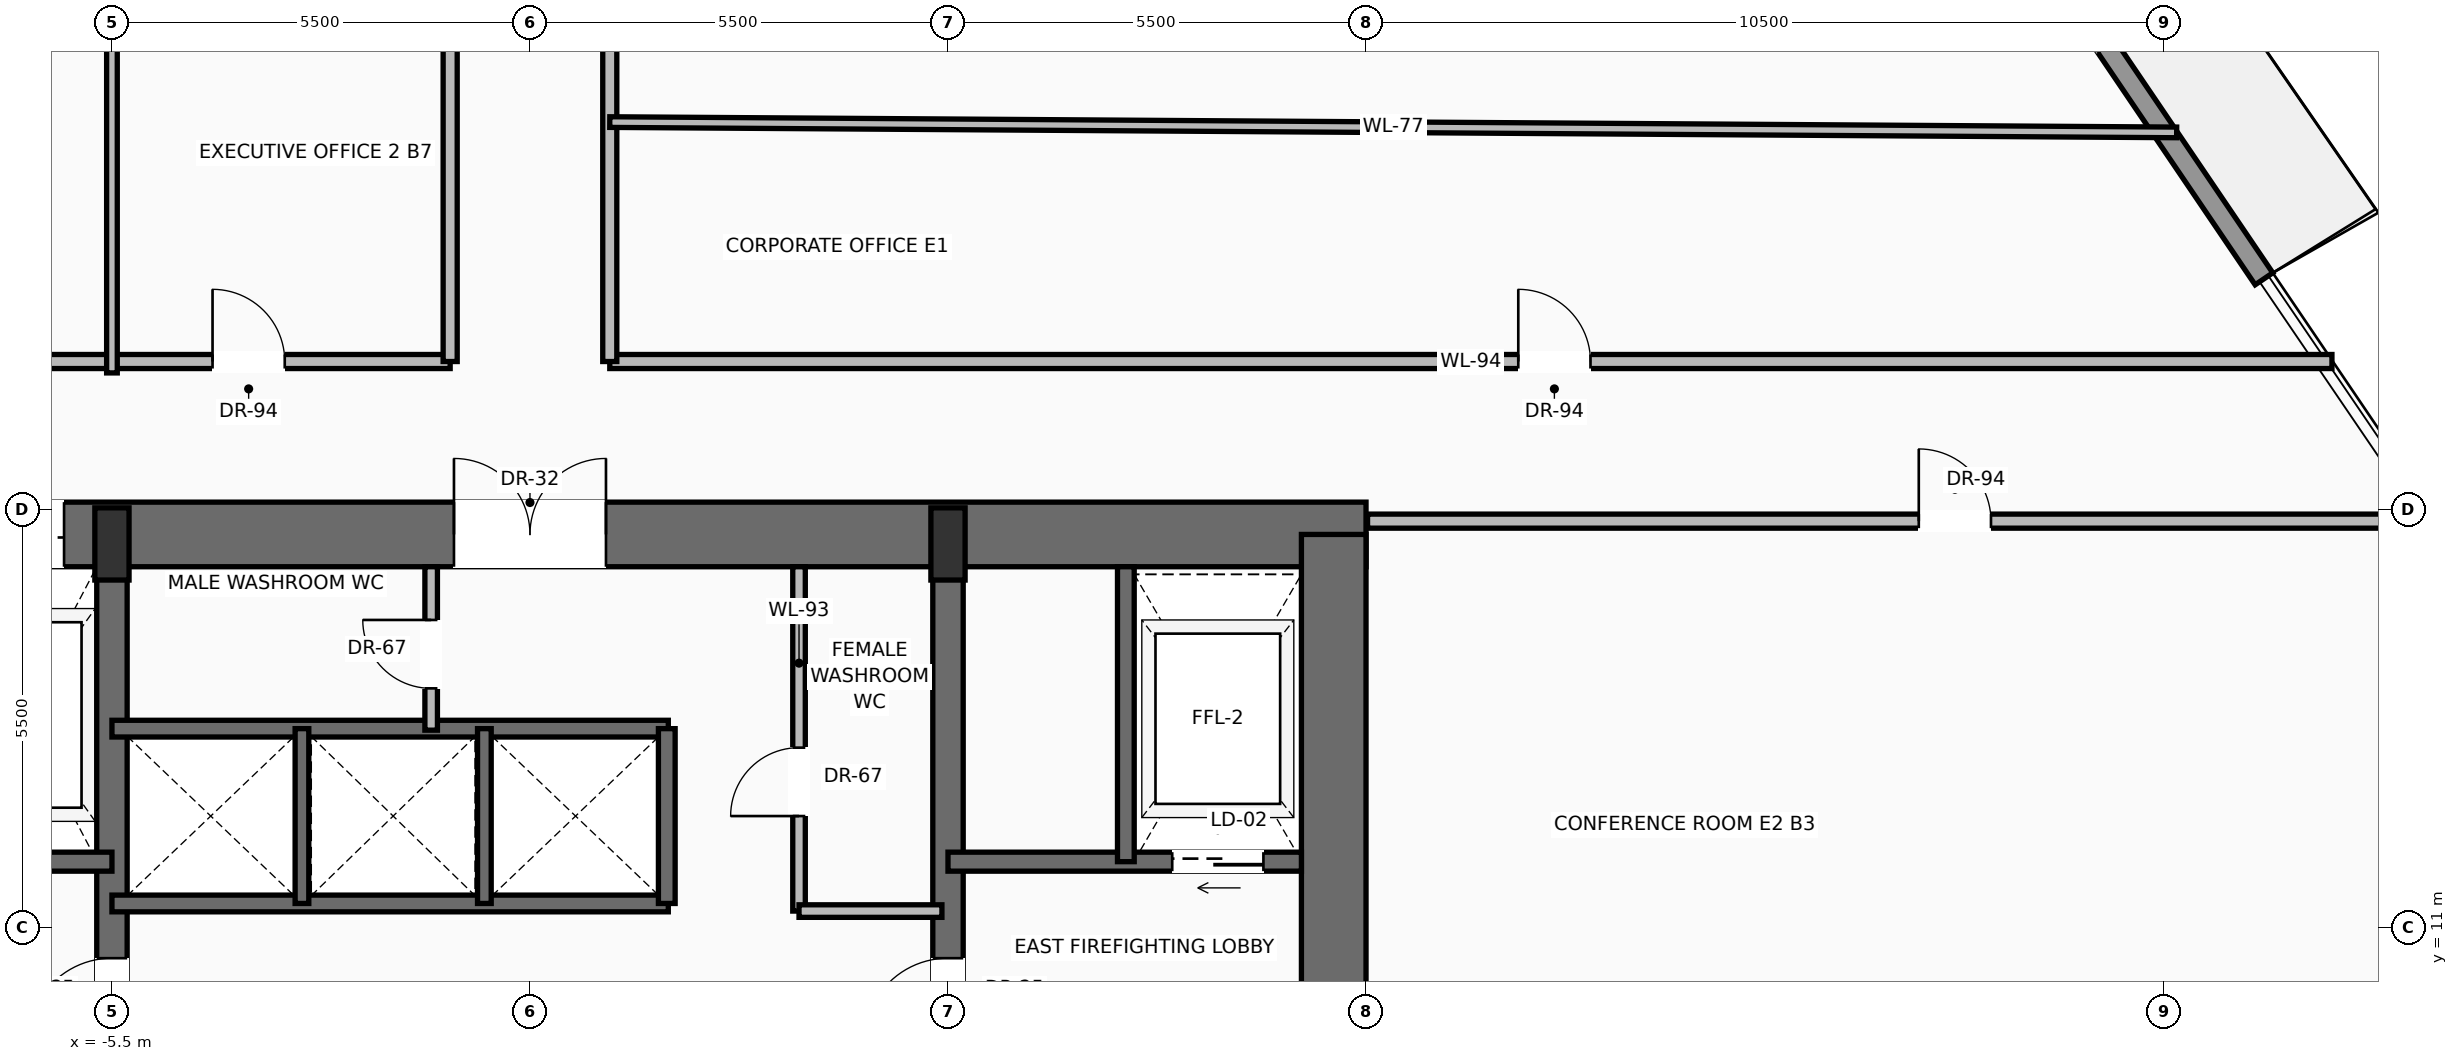
"""IFC4 building model, lengths in metres.
Left out: names, types, materials, properties, quantities, classifications, styles, units other than length and angle.
Written with IfcOpenShell. Run it as: python <this file> out.ifc"""

import sys

from ifc_helpers import new_model, si_unit, direction, frame, frame_2d, origin, origin_2d, place, context, subcontext, project, spatial, rectangle, extrude, source, transform, mapped, element, fill, save


model = new_model("IFC4")
c1 = context("Model", 3, precision=1e-05, world=origin(), true_north=direction((0.0, 1.0)))
c2 = subcontext(c1, "Body", "Model", "MODEL_VIEW")
j1 = project(units=[si_unit("LENGTHUNIT", "METRE"), si_unit("PLANEANGLEUNIT", "RADIAN")], contexts=[c1])
p1 = place(None, origin())
s1 = spatial("IfcSite", under=j1, at=p1, CompositionType="ELEMENT")
p2 = place(p1, origin())
s2 = spatial("IfcBuilding", under=s1, at=p2, CompositionType="ELEMENT")
p3 = place(p2, frame((0.0, 0.0, 34.9)))
s3 = spatial("IfcBuildingStorey", under=s2, at=p3, CompositionType="ELEMENT", Elevation=34.9)
p4 = place(p3, frame((-11.0, 16.175, 0.0), z_axis=(0.0, 0.0, 1.0), x_axis=(1.0, 0.0, 0.0)))
e1 = element("IfcWall", 1, at=p4, inside=s3, PredefinedType="SHEAR", context=c2, shape_type="SweptSolid", body=[
    extrude(rectangle(XDim=22.0, YDim=0.85, at=frame_2d((11.0, 0.0))), origin(), (0.0, 0.0, 1.0), 3.45),
])
p5 = place(p4, frame((3.57, 0.0, 0.0)))
e2 = element("IfcOpeningElement", 2, at=p5, cuts=e1, PredefinedType="OPENING", context=c2, shape_type="SweptSolid", body=[
    extrude(rectangle(XDim=1.3, YDim=2.3, at=frame_2d((0.65, 1.15))), frame((0.0, 0.435, 0.0), z_axis=(0.0, -1.0, 0.0), x_axis=(1.0, 0.0, 0.0)), (0.0, 0.0, 1.0), 0.87),
])
p6 = place(p4, frame((10.0, 0.0, 0.0)))
e3 = element("IfcOpeningElement", 3, at=p6, cuts=e1, PredefinedType="OPENING", context=c2, shape_type="SweptSolid", body=[
    extrude(rectangle(XDim=2.0, YDim=2.4, at=frame_2d((1.0, 1.2))), frame((0.0, 0.435, 0.0), z_axis=(0.0, -1.0, 0.0), x_axis=(1.0, 0.0, 0.0)), (0.0, 0.0, 1.0), 0.87),
])
p7 = place(p3, frame((10.575, 0.425, 0.0), z_axis=(0.0, 0.0, 1.0), x_axis=(0.0, 1.0, 0.0)))
e4 = element("IfcWall", 4, at=p7, inside=s3, PredefinedType="SHEAR", context=c2, shape_type="SweptSolid", body=[
    extrude(rectangle(XDim=15.75, YDim=0.85, at=frame_2d((7.875, 0.0))), origin(), (0.0, 0.0, 1.0), 3.45),
])
p8 = place(p3, frame((-5.5, 0.425, 0.0), z_axis=(0.0, 0.0, 1.0), x_axis=(0.0, 1.0, 0.0)))
e5 = element("IfcWall", 5, at=p8, inside=s3, PredefinedType="SHEAR", context=c2, shape_type="SweptSolid", body=[
    extrude(rectangle(XDim=15.75, YDim=0.4, at=frame_2d((7.875, 0.0))), origin(), (0.0, 0.0, 1.0), 3.45),
])
p9 = place(p8, frame((9.075, 0.0, 0.0)))
e6 = element("IfcOpeningElement", 6, at=p9, cuts=e5, PredefinedType="OPENING", context=c2, shape_type="SweptSolid", body=[
    extrude(rectangle(XDim=1.1, YDim=2.2, at=frame_2d((0.55, 1.1))), frame((0.0, 0.21, 0.0), z_axis=(0.0, -1.0, 0.0), x_axis=(1.0, 0.0, 0.0)), (0.0, 0.0, 1.0), 0.42),
])
p10 = place(p3, frame((5.5, 0.425, 0.0), z_axis=(0.0, 0.0, 1.0), x_axis=(0.0, 1.0, 0.0)))
e7 = element("IfcWall", 7, at=p10, inside=s3, PredefinedType="SHEAR", context=c2, shape_type="SweptSolid", body=[
    extrude(rectangle(XDim=15.75, YDim=0.4, at=frame_2d((7.875, 0.0))), origin(), (0.0, 0.0, 1.0), 3.45),
])
p11 = place(p10, frame((9.075, 0.0, 0.0)))
e8 = element("IfcOpeningElement", 8, at=p11, cuts=e7, PredefinedType="OPENING", context=c2, shape_type="SweptSolid", body=[
    extrude(rectangle(XDim=1.1, YDim=2.2, at=frame_2d((0.55, 1.1))), frame((0.0, 0.21, 0.0), z_axis=(0.0, -1.0, 0.0), x_axis=(1.0, 0.0, 0.0)), (0.0, 0.0, 1.0), 0.42),
])
m1 = source(origin(), c2, "Body", "SweptSolid", [
    extrude(rectangle(XDim=0.45, YDim=0.95, at=origin_2d()), origin(), (0.0, 0.0, 1.0), 3.7),
])
for number, where, z_axis, x_axis in (
    (9, (-5.5, 16.05, 0.0), (0.0, 0.0, 1.0), (1.0, 0.0, 0.0)),
    (10, (5.5, 16.05, 0.0), (0.0, 0.0, 1.0), (1.0, 0.0, 0.0)),
):
    element("IfcColumn", number, at=place(p3, frame(where, z_axis=z_axis, x_axis=x_axis)), inside=s3, PredefinedType="PILASTER", context=c2, shape_type="MappedRepresentation", body=[
        mapped(m1, transform((0.0, 0.0, 0.0), scale=1.0)),
    ])
p12 = place(p3, frame((13.629, 33.09, 0.0), z_axis=(0.0, 0.0, 1.0), x_axis=(0.56106773426, -0.827769894096, 0.0)))
e11 = element("IfcWall", 11, at=p12, inside=s3, PredefinedType="SOLIDWALL", context=c2, shape_type="SweptSolid", body=[
    extrude(rectangle(XDim=16.371, YDim=0.28, at=frame_2d((8.186, 0.0))), origin(), (0.0, 0.0, 1.0), 3.03),
])
p13 = place(p12, frame((3.929, 0.0, 0.0)))
e12 = element("IfcOpeningElement", 12, at=p13, cuts=e11, PredefinedType="OPENING", context=c2, shape_type="SweptSolid", body=[
    extrude(rectangle(XDim=1.6, YDim=2.35, at=frame_2d((0.8, 1.175))), frame((0.0, 0.15, 0.0), z_axis=(0.0, -1.0, 0.0), x_axis=(1.0, 0.0, 0.0)), (0.0, 0.0, 1.0), 0.3),
])
p14 = place(p12, frame((11.132, 0.0, 0.9)))
e13 = element("IfcOpeningElement", 13, at=p14, cuts=e11, PredefinedType="OPENING", context=c2, shape_type="SweptSolid", body=[
    extrude(rectangle(XDim=1.55, YDim=1.85, at=frame_2d((0.775, 0.925))), frame((0.0, 0.15, 0.0), z_axis=(0.0, -1.0, 0.0), x_axis=(1.0, 0.0, 0.0)), (0.0, 0.0, 1.0), 0.3),
])
p15 = place(p3, frame((-5.5, 11.87, 0.0), z_axis=(0.0, 0.0, 1.0), x_axis=(-1.0, 0.0, 0.0)))
e14 = element("IfcWall", 14, at=p15, inside=s3, PredefinedType="SOLIDWALL", context=c2, shape_type="SweptSolid", body=[
    extrude(rectangle(XDim=4.65, YDim=0.25, at=frame_2d((2.325, 0.0))), origin(), (0.0, 0.0, 1.0), 3.45),
])
p16 = place(p15, frame((2.95, 0.0, 0.0)))
e15 = element("IfcOpeningElement", 15, at=p16, cuts=e14, PredefinedType="OPENING", context=c2, shape_type="SweptSolid", body=[
    extrude(rectangle(XDim=1.2, YDim=2.25, at=frame_2d((0.6, 1.125))), frame((0.0, 0.135, 0.0), z_axis=(0.0, -1.0, 0.0), x_axis=(1.0, 0.0, 0.0)), (0.0, 0.0, 1.0), 0.27),
])
p17 = place(p3, frame((10.15, 11.87, 0.0), z_axis=(0.0, 0.0, 1.0), x_axis=(-1.0, 0.0, 0.0)))
e16 = element("IfcWall", 16, at=p17, inside=s3, PredefinedType="SOLIDWALL", context=c2, shape_type="SweptSolid", body=[
    extrude(rectangle(XDim=4.65, YDim=0.25, at=frame_2d((2.325, 0.0))), origin(), (0.0, 0.0, 1.0), 3.45),
])
p18 = place(p17, frame((0.5, 0.0, 0.0)))
e17 = element("IfcOpeningElement", 17, at=p18, cuts=e16, PredefinedType="OPENING", context=c2, shape_type="SweptSolid", body=[
    extrude(rectangle(XDim=1.2, YDim=2.25, at=frame_2d((0.6, 1.125))), frame((0.0, 0.135, 0.0), z_axis=(0.0, -1.0, 0.0), x_axis=(1.0, 0.0, 0.0)), (0.0, 0.0, 1.0), 0.27),
])
p19 = place(p3, frame((7.84, 11.87, 0.0), z_axis=(0.0, 0.0, 1.0), x_axis=(0.0, 1.0, 0.0)))
e18 = element("IfcWall", 18, at=p19, inside=s3, PredefinedType="SOLIDWALL", context=c2, shape_type="SweptSolid", body=[
    extrude(rectangle(XDim=3.88, YDim=0.22, at=frame_2d((1.94, 0.0))), origin(), (0.0, 0.0, 1.0), 3.45),
])
for number, where, z_axis, x_axis in (
    (19, (-5.5, 11.32, 0.0), (0.0, 0.0, 1.0), (1.0, 0.0, 0.0)),
    (20, (-5.5, 13.62, 0.0), (0.0, 0.0, 1.0), (1.0, 0.0, 0.0)),
):
    element("IfcWall", number, at=place(p3, frame(where, z_axis=z_axis, x_axis=x_axis)), inside=s3, PredefinedType="SOLIDWALL", context=c2, shape_type="SweptSolid", body=[
        extrude(rectangle(XDim=7.32, YDim=0.22, at=frame_2d((3.66, 0.0))), origin(), (0.0, 0.0, 1.0), 3.45),
    ])
p20 = place(p3, frame((1.8, 11.32, 0.0), z_axis=(0.0, 0.0, 1.0), x_axis=(0.0, 1.0, 0.0)))
e21 = element("IfcWall", 21, at=p20, inside=s3, PredefinedType="SOLIDWALL", context=c2, shape_type="SweptSolid", body=[
    extrude(rectangle(XDim=2.3, YDim=0.22, at=frame_2d((1.15, 0.0))), origin(), (0.0, 0.0, 1.0), 3.45),
])
for number, where, z_axis, x_axis in (
    (22, (-3.0, 11.32, 0.0), (0.0, 0.0, 1.0), (0.0, 1.0, 0.0)),
    (23, (-0.6, 11.32, 0.0), (0.0, 0.0, 1.0), (0.0, 1.0, 0.0)),
):
    element("IfcWall", number, at=place(p3, frame(where, z_axis=z_axis, x_axis=x_axis)), inside=s3, PredefinedType="SOLIDWALL", context=c2, shape_type="SweptSolid", body=[
        extrude(rectangle(XDim=2.3, YDim=0.18, at=frame_2d((1.15, 0.0))), origin(), (0.0, 0.0, 1.0), 3.45),
    ])
p21 = place(p3, frame((-1.3, 13.6, 0.0), z_axis=(0.0, 0.0, 1.0), x_axis=(0.0, 1.0, 0.0)))
e24 = element("IfcWall", 24, at=p21, inside=s3, PredefinedType="PARTITIONING", context=c2, shape_type="SweptSolid", body=[
    extrude(rectangle(XDim=2.15, YDim=0.165, at=frame_2d((1.075, 0.0))), origin(), (0.0, 0.0, 1.0), 3.442),
])
p22 = place(p21, frame((0.55, 0.0, 0.0)))
e25 = element("IfcOpeningElement", 25, at=p22, cuts=e24, PredefinedType="OPENING", context=c2, shape_type="SweptSolid", body=[
    extrude(rectangle(XDim=0.9, YDim=2.1, at=frame_2d((0.45, 1.05))), frame((0.0, 0.093, 0.0), z_axis=(0.0, -1.0, 0.0), x_axis=(1.0, 0.0, 0.0)), (0.0, 0.0, 1.0), 0.185),
])
p23 = place(p3, frame((3.54, 11.22, 0.0), z_axis=(0.0, 0.0, 1.0), x_axis=(0.0, 1.0, 0.0)))
e26 = element("IfcWall", 26, at=p23, inside=s3, PredefinedType="PARTITIONING", context=c2, shape_type="SweptSolid", body=[
    extrude(rectangle(XDim=4.53, YDim=0.165, at=frame_2d((2.265, 0.0))), origin(), (0.0, 0.0, 1.0), 3.442),
])
p24 = place(p23, frame((1.25, 0.0, 0.0)))
e27 = element("IfcOpeningElement", 27, at=p24, cuts=e26, PredefinedType="OPENING", context=c2, shape_type="SweptSolid", body=[
    extrude(rectangle(XDim=0.9, YDim=2.1, at=frame_2d((0.45, 1.05))), frame((0.0, 0.093, 0.0), z_axis=(0.0, -1.0, 0.0), x_axis=(1.0, 0.0, 0.0)), (0.0, 0.0, 1.0), 0.185),
])
p25 = place(p3, frame((3.54, 11.22, 0.0), z_axis=(0.0, 0.0, 1.0), x_axis=(1.0, 0.0, 0.0)))
e28 = element("IfcWall", 28, at=p25, inside=s3, PredefinedType="PARTITIONING", context=c2, shape_type="SweptSolid", body=[
    extrude(rectangle(XDim=1.88, YDim=0.165, at=frame_2d((0.94, 0.0))), origin(), (0.0, 0.0, 1.0), 3.442),
])
p26 = place(p3, frame((11.02, 16.35, 0.0), z_axis=(0.0, 0.0, 1.0), x_axis=(1.0, 0.0, 0.0)))
e29 = element("IfcWall", 29, at=p26, inside=s3, PredefinedType="PARTITIONING", context=c2, shape_type="SweptSolid", body=[
    extrude(rectangle(XDim=14.112, YDim=0.185, at=frame_2d((7.056, 0.0))), origin(), (0.0, 0.0, 1.0), 2.747),
])
p27 = place(p26, frame((7.253, 0.0, 0.0)))
e30 = element("IfcOpeningElement", 30, at=p27, cuts=e29, PredefinedType="OPENING", context=c2, shape_type="SweptSolid", body=[
    extrude(rectangle(XDim=0.95, YDim=2.2, at=frame_2d((0.475, 1.1))), frame((0.0, 0.103, 0.0), z_axis=(0.0, -1.0, 0.0), x_axis=(1.0, 0.0, 0.0)), (0.0, 0.0, 1.0), 0.205),
])
p28 = place(p3, frame((-23.632, 18.45, 0.0), z_axis=(0.0, 0.0, 1.0), x_axis=(1.0, 0.0, 0.0)))
e31 = element("IfcWall", 31, at=p28, inside=s3, PredefinedType="PARTITIONING", context=c2, shape_type="SweptSolid", body=[
    extrude(rectangle(XDim=22.582, YDim=0.185, at=frame_2d((11.291, 0.0))), origin(), (0.0, 0.0, 1.0), 2.747),
])
p29 = place(p28, frame((9.721, 0.0, 0.0)))
e32 = element("IfcOpeningElement", 32, at=p29, cuts=e31, PredefinedType="OPENING", context=c2, shape_type="SweptSolid", body=[
    extrude(rectangle(XDim=0.95, YDim=2.2, at=frame_2d((0.475, 1.1))), frame((0.0, 0.103, 0.0), z_axis=(0.0, -1.0, 0.0), x_axis=(1.0, 0.0, 0.0)), (0.0, 0.0, 1.0), 0.205),
])
p30 = place(p28, frame((19.456, 0.0, 0.0)))
e33 = element("IfcOpeningElement", 33, at=p30, cuts=e31, PredefinedType="OPENING", context=c2, shape_type="SweptSolid", body=[
    extrude(rectangle(XDim=0.95, YDim=2.2, at=frame_2d((0.475, 1.1))), frame((0.0, 0.103, 0.0), z_axis=(0.0, -1.0, 0.0), x_axis=(1.0, 0.0, 0.0)), (0.0, 0.0, 1.0), 0.205),
])
p31 = place(p3, frame((1.05, 18.45, 0.0), z_axis=(0.0, 0.0, 1.0), x_axis=(1.0, 0.0, 0.0)))
e34 = element("IfcWall", 34, at=p31, inside=s3, PredefinedType="PARTITIONING", context=c2, shape_type="SweptSolid", body=[
    extrude(rectangle(XDim=22.659, YDim=0.185, at=frame_2d((11.329, 0.0))), origin(), (0.0, 0.0, 1.0), 2.747),
])
p32 = place(p31, frame((11.953, 0.0, 0.0)))
e35 = element("IfcOpeningElement", 35, at=p32, cuts=e34, PredefinedType="OPENING", context=c2, shape_type="SweptSolid", body=[
    extrude(rectangle(XDim=0.95, YDim=2.2, at=frame_2d((0.475, 1.1))), frame((0.0, 0.103, 0.0), z_axis=(0.0, -1.0, 0.0), x_axis=(1.0, 0.0, 0.0)), (0.0, 0.0, 1.0), 0.205),
])
p33 = place(p3, frame((-1.05, 18.45, 0.0), z_axis=(0.0, 0.0, 1.0), x_axis=(0.0, 1.0, 0.0)))
e36 = element("IfcWall", 36, at=p33, inside=s3, PredefinedType="PARTITIONING", context=c2, shape_type="SweptSolid", body=[
    extrude(rectangle(XDim=14.05, YDim=0.185, at=frame_2d((7.025, 0.0))), origin(), (0.0, 0.0, 1.0), 2.747),
])
p34 = place(p33, frame((4.63, 0.0, 0.0)))
e37 = element("IfcOpeningElement", 37, at=p34, cuts=e36, PredefinedType="OPENING", context=c2, shape_type="SweptSolid", body=[
    extrude(rectangle(XDim=0.95, YDim=2.2, at=frame_2d((0.475, 1.1))), frame((0.0, 0.103, 0.0), z_axis=(0.0, -1.0, 0.0), x_axis=(1.0, 0.0, 0.0)), (0.0, 0.0, 1.0), 0.205),
])
p35 = place(p3, frame((1.05, 18.45, 0.0), z_axis=(0.0, 0.0, 1.0), x_axis=(0.0, 1.0, 0.0)))
e38 = element("IfcWall", 38, at=p35, inside=s3, PredefinedType="PARTITIONING", context=c2, shape_type="SweptSolid", body=[
    extrude(rectangle(XDim=14.05, YDim=0.185, at=frame_2d((7.025, 0.0))), origin(), (0.0, 0.0, 1.0), 2.747),
])
p36 = place(p35, frame((8.496, 0.0, 0.0)))
e39 = element("IfcOpeningElement", 39, at=p36, cuts=e38, PredefinedType="OPENING", context=c2, shape_type="SweptSolid", body=[
    extrude(rectangle(XDim=0.95, YDim=2.2, at=frame_2d((0.475, 1.1))), frame((0.0, 0.103, 0.0), z_axis=(0.0, -1.0, 0.0), x_axis=(1.0, 0.0, 0.0)), (0.0, 0.0, 1.0), 0.205),
])
p37 = place(p3, frame((-5.5, 18.3, 0.0), z_axis=(0.0, 0.0, 1.0), x_axis=(0.0, 1.0, 0.0)))
e40 = element("IfcWall", 40, at=p37, inside=s3, PredefinedType="PARTITIONING", context=c2, shape_type="SweptSolid", body=[
    extrude(rectangle(XDim=13.2, YDim=0.14, at=frame_2d((6.6, 0.0))), origin(), (0.0, 0.0, 1.0), 2.747),
])
p38 = place(p37, frame((9.065, 0.0, 0.0)))
e41 = element("IfcOpeningElement", 41, at=p38, cuts=e40, PredefinedType="OPENING", context=c2, shape_type="SweptSolid", body=[
    extrude(rectangle(XDim=0.95, YDim=2.2, at=frame_2d((0.475, 1.1))), frame((0.0, 0.08, 0.0), z_axis=(0.0, -1.0, 0.0), x_axis=(1.0, 0.0, 0.0)), (0.0, 0.0, 1.0), 0.16),
])
p39 = place(p3, frame((-21.276, 21.905, 0.0), z_axis=(0.0, 0.0, 1.0), x_axis=(0.998537212519, 0.054068800745, 0.0)))
e42 = element("IfcWall", 42, at=p39, inside=s3, PredefinedType="PARTITIONING", context=c2, shape_type="SweptSolid", body=[
    extrude(rectangle(XDim=20.256, YDim=0.14, at=frame_2d((10.128, 0.0))), origin(), (0.0, 0.0, 1.0), 2.747),
])
p40 = place(p3, frame((1.05, 21.6, 0.0), z_axis=(0.0, 0.0, 1.0), x_axis=(0.999978245495, -0.006596100077, 0.0)))
e43 = element("IfcWall", 43, at=p40, inside=s3, PredefinedType="PARTITIONING", context=c2, shape_type="SweptSolid", body=[
    extrude(rectangle(XDim=20.616, YDim=0.14, at=frame_2d((10.308, 0.0))), origin(), (0.0, 0.0, 1.0), 2.747),
])
m2 = source(origin(), c2, "Body", "SweptSolid", [
    extrude(rectangle(XDim=1.1, YDim=2.2, at=frame_2d((0.55, 1.1))), frame((0.0, 0.025, 0.0), z_axis=(0.0, -1.0, 0.0), x_axis=(1.0, 0.0, 0.0)), (0.0, 0.0, 1.0), 0.05),
])
p41 = place(p9, origin())
e44 = element("IfcDoor", 44, at=p41, inside=s3, OperationType="SINGLE_SWING_LEFT", PredefinedType="DOOR", context=c2, shape_type="MappedRepresentation", body=[
    mapped(m2, transform((0.0, 0.0, 0.0), scale=1.0)),
])
fill(e6, e44)
m3 = source(origin(), c2, "Body", "SweptSolid", [
    extrude(rectangle(XDim=1.3, YDim=2.3, at=frame_2d((0.65, 1.15))), frame((0.0, 0.025, 0.0), z_axis=(0.0, -1.0, 0.0), x_axis=(1.0, 0.0, 0.0)), (0.0, 0.0, 1.0), 0.05),
])
p42 = place(p5, origin())
e45 = element("IfcDoor", 45, at=p42, inside=s3, OperationType="SLIDING_TO_RIGHT", PredefinedType="DOOR", context=c2, shape_type="MappedRepresentation", body=[
    mapped(m3, transform((0.0, 0.0, 0.0), scale=1.0)),
])
fill(e2, e45)
p43 = place(p11, origin())
e46 = element("IfcDoor", 46, at=p43, inside=s3, OperationType="SINGLE_SWING_LEFT", PredefinedType="DOOR", context=c2, shape_type="MappedRepresentation", body=[
    mapped(m2, transform((0.0, 0.0, 0.0), scale=1.0)),
])
fill(e8, e46)
m4 = source(origin(), c2, "Body", "SweptSolid", [
    extrude(rectangle(XDim=1.2, YDim=2.25, at=frame_2d((0.6, 1.125))), frame((0.0, 0.025, 0.0), z_axis=(0.0, -1.0, 0.0), x_axis=(1.0, 0.0, 0.0)), (0.0, 0.0, 1.0), 0.05),
])
p44 = place(p18, origin())
e47 = element("IfcDoor", 47, at=p44, inside=s3, OperationType="SLIDING_TO_RIGHT", PredefinedType="DOOR", context=c2, shape_type="MappedRepresentation", body=[
    mapped(m4, transform((0.0, 0.0, 0.0), scale=1.0)),
])
fill(e17, e47)
m5 = source(origin(), c2, "Body", "SweptSolid", [
    extrude(rectangle(XDim=2.0, YDim=2.4, at=frame_2d((1.0, 1.2))), frame((0.0, 0.025, 0.0), z_axis=(0.0, -1.0, 0.0), x_axis=(1.0, 0.0, 0.0)), (0.0, 0.0, 1.0), 0.05),
])
p45 = place(p6, origin())
e48 = element("IfcDoor", 48, at=p45, inside=s3, OperationType="DOUBLE_DOOR_SINGLE_SWING", PredefinedType="DOOR", context=c2, shape_type="MappedRepresentation", body=[
    mapped(m5, transform((0.0, 0.0, 0.0), scale=1.0)),
])
fill(e3, e48)
m6 = source(origin(), c2, "Body", "SweptSolid", [
    extrude(rectangle(XDim=0.9, YDim=2.1, at=frame_2d((0.45, 1.05))), frame((0.0, 0.025, 0.0), z_axis=(0.0, -1.0, 0.0), x_axis=(1.0, 0.0, 0.0)), (0.0, 0.0, 1.0), 0.05),
])
p46 = place(p22, origin())
e49 = element("IfcDoor", 49, at=p46, inside=s3, OperationType="SINGLE_SWING_RIGHT", PredefinedType="DOOR", context=c2, shape_type="MappedRepresentation", body=[
    mapped(m6, transform((0.0, 0.0, 0.0), scale=1.0)),
])
fill(e25, e49)
p47 = place(p24, origin())
e50 = element("IfcDoor", 50, at=p47, inside=s3, OperationType="SINGLE_SWING_LEFT", PredefinedType="DOOR", context=c2, shape_type="MappedRepresentation", body=[
    mapped(m6, transform((0.0, 0.0, 0.0), scale=1.0)),
])
fill(e27, e50)
m7 = source(origin(), c2, "Body", "SweptSolid", [
    extrude(rectangle(XDim=0.95, YDim=2.2, at=frame_2d((0.475, 1.1))), frame((0.0, 0.025, 0.0), z_axis=(0.0, -1.0, 0.0), x_axis=(1.0, 0.0, 0.0)), (0.0, 0.0, 1.0), 0.05),
])
p48 = place(p27, origin())
e51 = element("IfcDoor", 51, at=p48, inside=s3, OperationType="SINGLE_SWING_LEFT", PredefinedType="DOOR", context=c2, shape_type="MappedRepresentation", body=[
    mapped(m7, transform((0.0, 0.0, 0.0), scale=1.0)),
])
fill(e30, e51)
p49 = place(p32, origin())
e52 = element("IfcDoor", 52, at=p49, inside=s3, OperationType="SINGLE_SWING_LEFT", PredefinedType="DOOR", context=c2, shape_type="MappedRepresentation", body=[
    mapped(m7, transform((0.0, 0.0, 0.0), scale=1.0)),
])
fill(e35, e52)
p50 = place(p30, origin())
e53 = element("IfcDoor", 53, at=p50, inside=s3, OperationType="SINGLE_SWING_LEFT", PredefinedType="DOOR", context=c2, shape_type="MappedRepresentation", body=[
    mapped(m7, transform((0.0, 0.0, 0.0), scale=1.0)),
])
fill(e33, e53)
save(model, sys.argv[1])
